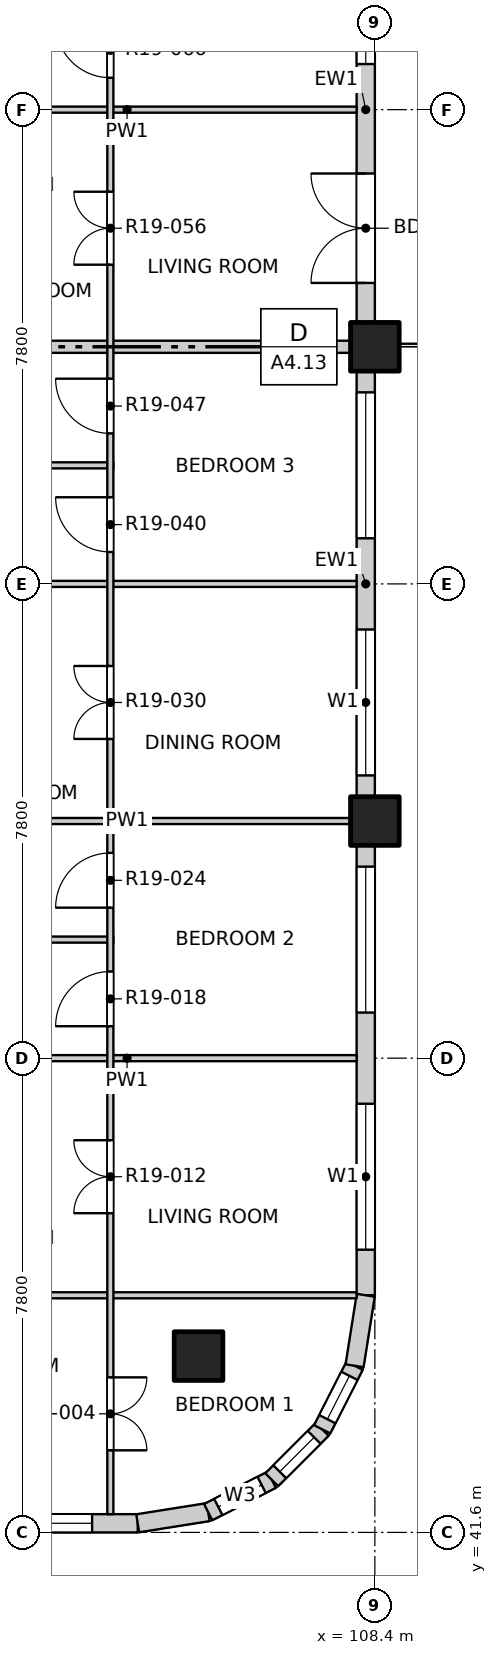
"""IFC4 building model, lengths in metres.
Left out: names, types, materials, properties, quantities, classifications, styles, units other than length and angle.
Written with IfcOpenShell. Run it as: python <this file> out.ifc"""

import sys

from ifc_helpers import new_model, si_unit, direction, frame, frame_2d, origin, origin_2d, place, context, subcontext, project, spatial, rectangle, extrude, element, fill, save


model = new_model("IFC4")
c1 = context("Model", 3, precision=1e-05, world=origin(), true_north=direction((0.0, 1.0)))
c2 = subcontext(c1, "Body", "Model", "MODEL_VIEW")
j1 = project(units=[si_unit("LENGTHUNIT", "METRE"), si_unit("PLANEANGLEUNIT", "RADIAN")], contexts=[c1])
p1 = place(None, origin())
s1 = spatial("IfcSite", under=j1, at=p1, CompositionType="ELEMENT")
p2 = place(p1, origin())
s2 = spatial("IfcBuilding", under=s1, at=p2, CompositionType="ELEMENT")
p3 = place(p2, frame((0.0, 0.0, 197.3)))
s3 = spatial("IfcBuildingStorey", under=s2, at=p3, CompositionType="ELEMENT", Elevation=197.3)
for number, where, z_axis, x_axis in (
    (1, (105.5, 44.5, -0.3), (0.0, 0.0, 1.0), (1.0, 0.0, 0.0)),
    (2, (108.4, 53.3, -0.3), (0.0, 0.0, 1.0), (1.0, 0.0, 0.0)),
    (3, (108.4, 61.1, -0.3), (0.0, 0.0, 1.0), (1.0, 0.0, 0.0)),
):
    element("IfcColumn", number, at=place(p3, frame(where, z_axis=z_axis, x_axis=x_axis)), inside=s3, PredefinedType="COLUMN", context=c2, shape_type="SweptSolid", body=[
        extrude(rectangle(XDim=0.8, YDim=0.8, at=origin_2d()), origin(), (0.0, 0.0, 1.0), 3.45),
    ])
p4 = place(p3, frame((97.1, 41.75, 0.0), z_axis=(0.0, 0.0, 1.0), x_axis=(1.0, 0.0, 0.0)))
e4 = element("IfcWall", 4, at=p4, inside=s3, PredefinedType="SOLIDWALL", context=c2, shape_type="SweptSolid", body=[
    extrude(rectangle(XDim=7.4, YDim=0.3, at=frame_2d((3.7, 0.0))), origin(), (0.0, 0.0, 1.0), 2.7),
])
p5 = place(p4, frame((0.35, 0.0, 0.9)))
e5 = element("IfcOpeningElement", 5, at=p5, cuts=e4, PredefinedType="OPENING", context=c2, shape_type="SweptSolid", body=[
    extrude(rectangle(XDim=2.4, YDim=1.8, at=frame_2d((1.2, 0.9))), frame((0.0, 0.16, 0.0), z_axis=(0.0, -1.0, 0.0), x_axis=(1.0, 0.0, 0.0)), (0.0, 0.0, 1.0), 0.32),
])
p6 = place(p4, frame((4.25, 0.0, 0.9)))
e6 = element("IfcOpeningElement", 6, at=p6, cuts=e4, PredefinedType="OPENING", context=c2, shape_type="SweptSolid", body=[
    extrude(rectangle(XDim=2.4, YDim=1.8, at=frame_2d((1.2, 0.9))), frame((0.0, 0.16, 0.0), z_axis=(0.0, -1.0, 0.0), x_axis=(1.0, 0.0, 0.0)), (0.0, 0.0, 1.0), 0.32),
])
p7 = place(p3, frame((108.25, 45.5, 0.0), z_axis=(0.0, 0.0, 1.0), x_axis=(0.0, 1.0, 0.0)))
e7 = element("IfcWall", 7, at=p7, inside=s3, PredefinedType="SOLIDWALL", context=c2, shape_type="SweptSolid", body=[
    extrude(rectangle(XDim=7.4, YDim=0.3, at=frame_2d((3.7, 0.0))), origin(), (0.0, 0.0, 1.0), 2.7),
])
p8 = place(p7, frame((0.75, 0.0, 0.9)))
e8 = element("IfcOpeningElement", 8, at=p8, cuts=e7, PredefinedType="OPENING", context=c2, shape_type="SweptSolid", body=[
    extrude(rectangle(XDim=2.4, YDim=1.8, at=frame_2d((1.2, 0.9))), frame((0.0, 0.16, 0.0), z_axis=(0.0, -1.0, 0.0), x_axis=(1.0, 0.0, 0.0)), (0.0, 0.0, 1.0), 0.32),
])
p9 = place(p7, frame((4.65, 0.0, 0.9)))
e9 = element("IfcOpeningElement", 9, at=p9, cuts=e7, PredefinedType="OPENING", context=c2, shape_type="SweptSolid", body=[
    extrude(rectangle(XDim=2.4, YDim=1.8, at=frame_2d((1.2, 0.9))), frame((0.0, 0.16, 0.0), z_axis=(0.0, -1.0, 0.0), x_axis=(1.0, 0.0, 0.0)), (0.0, 0.0, 1.0), 0.32),
])
p10 = place(p3, frame((108.25, 53.7, 0.0), z_axis=(0.0, 0.0, 1.0), x_axis=(0.0, 1.0, 0.0)))
e10 = element("IfcWall", 10, at=p10, inside=s3, PredefinedType="SOLIDWALL", context=c2, shape_type="SweptSolid", body=[
    extrude(rectangle(XDim=7.0, YDim=0.3, at=frame_2d((3.5, 0.0))), origin(), (0.0, 0.0, 1.0), 2.7),
])
p11 = place(p10, frame((0.35, 0.0, 0.9)))
e11 = element("IfcOpeningElement", 11, at=p11, cuts=e10, PredefinedType="OPENING", context=c2, shape_type="SweptSolid", body=[
    extrude(rectangle(XDim=2.4, YDim=1.8, at=frame_2d((1.2, 0.9))), frame((0.0, 0.16, 0.0), z_axis=(0.0, -1.0, 0.0), x_axis=(1.0, 0.0, 0.0)), (0.0, 0.0, 1.0), 0.32),
])
p12 = place(p10, frame((4.25, 0.0, 0.9)))
e12 = element("IfcOpeningElement", 12, at=p12, cuts=e10, PredefinedType="OPENING", context=c2, shape_type="SweptSolid", body=[
    extrude(rectangle(XDim=2.4, YDim=1.8, at=frame_2d((1.2, 0.9))), frame((0.0, 0.16, 0.0), z_axis=(0.0, -1.0, 0.0), x_axis=(1.0, 0.0, 0.0)), (0.0, 0.0, 1.0), 0.32),
])
p13 = place(p3, frame((108.25, 61.5, 0.0), z_axis=(0.0, 0.0, 1.0), x_axis=(0.0, 1.0, 0.0)))
e13 = element("IfcWall", 13, at=p13, inside=s3, PredefinedType="SOLIDWALL", context=c2, shape_type="SweptSolid", body=[
    extrude(rectangle(XDim=7.0, YDim=0.3, at=frame_2d((3.5, 0.0))), origin(), (0.0, 0.0, 1.0), 2.7),
])
p14 = place(p13, frame((0.65, 0.0, 0.0)))
e14 = element("IfcOpeningElement", 14, at=p14, cuts=e13, PredefinedType="OPENING", context=c2, shape_type="SweptSolid", body=[
    extrude(rectangle(XDim=1.8, YDim=2.4, at=frame_2d((0.9, 1.2))), frame((0.0, 0.16, 0.0), z_axis=(0.0, -1.0, 0.0), x_axis=(1.0, 0.0, 0.0)), (0.0, 0.0, 1.0), 0.32),
])
p15 = place(p13, frame((4.25, 0.0, 0.9)))
e15 = element("IfcOpeningElement", 15, at=p15, cuts=e13, PredefinedType="OPENING", context=c2, shape_type="SweptSolid", body=[
    extrude(rectangle(XDim=2.4, YDim=1.8, at=frame_2d((1.2, 0.9))), frame((0.0, 0.16, 0.0), z_axis=(0.0, -1.0, 0.0), x_axis=(1.0, 0.0, 0.0)), (0.0, 0.0, 1.0), 0.32),
])
p16 = place(p3, frame((104.5, 41.75, 0.0), z_axis=(0.0, 0.0, 1.0), x_axis=(0.987678452879, 0.156496880861, 0.0)))
e16 = element("IfcWall", 16, at=p16, inside=s3, PredefinedType="SOLIDWALL", context=c2, shape_type="SweptSolid", body=[
    extrude(rectangle(XDim=1.173, YDim=0.3, at=frame_2d((0.586, 0.0))), origin(), (0.0, 0.0, 1.0), 2.7),
])
p17 = place(p3, frame((105.659, 41.934, 0.0), z_axis=(0.0, 0.0, 1.0), x_axis=(0.890988677504, 0.454025524128, 0.0)))
e17 = element("IfcWall", 17, at=p17, inside=s3, PredefinedType="SOLIDWALL", context=c2, shape_type="SweptSolid", body=[
    extrude(rectangle(XDim=1.173, YDim=0.3, at=frame_2d((0.587, 0.0))), origin(), (0.0, 0.0, 1.0), 2.7),
])
p18 = place(p17, frame((0.187, 0.0, 0.9)))
e18 = element("IfcOpeningElement", 18, at=p18, cuts=e17, PredefinedType="OPENING", context=c2, shape_type="SweptSolid", body=[
    extrude(rectangle(XDim=0.8, YDim=1.2, at=frame_2d((0.4, 0.6))), frame((0.0, 0.16, 0.0), z_axis=(0.0, -1.0, 0.0), x_axis=(1.0, 0.0, 0.0)), (0.0, 0.0, 1.0), 0.32),
])
p19 = place(p3, frame((106.704, 42.466, 0.0), z_axis=(0.0, 0.0, 1.0), x_axis=(0.707106781187, 0.707106781187, 0.0)))
e19 = element("IfcWall", 19, at=p19, inside=s3, PredefinedType="SOLIDWALL", context=c2, shape_type="SweptSolid", body=[
    extrude(rectangle(XDim=1.173, YDim=0.3, at=frame_2d((0.586, 0.0))), origin(), (0.0, 0.0, 1.0), 2.7),
])
p20 = place(p19, frame((0.187, 0.0, 0.9)))
e20 = element("IfcOpeningElement", 20, at=p20, cuts=e19, PredefinedType="OPENING", context=c2, shape_type="SweptSolid", body=[
    extrude(rectangle(XDim=0.8, YDim=1.2, at=frame_2d((0.4, 0.6))), frame((0.0, 0.16, 0.0), z_axis=(0.0, -1.0, 0.0), x_axis=(1.0, 0.0, 0.0)), (0.0, 0.0, 1.0), 0.32),
])
p21 = place(p3, frame((107.534, 43.296, 0.0), z_axis=(0.0, 0.0, 1.0), x_axis=(0.454025524128, 0.890988677504, 0.0)))
e21 = element("IfcWall", 21, at=p21, inside=s3, PredefinedType="SOLIDWALL", context=c2, shape_type="SweptSolid", body=[
    extrude(rectangle(XDim=1.173, YDim=0.3, at=frame_2d((0.587, 0.0))), origin(), (0.0, 0.0, 1.0), 2.7),
])
p22 = place(p21, frame((0.187, 0.0, 0.9)))
e22 = element("IfcOpeningElement", 22, at=p22, cuts=e21, PredefinedType="OPENING", context=c2, shape_type="SweptSolid", body=[
    extrude(rectangle(XDim=0.8, YDim=1.2, at=frame_2d((0.4, 0.6))), frame((0.0, 0.16, 0.0), z_axis=(0.0, -1.0, 0.0), x_axis=(1.0, 0.0, 0.0)), (0.0, 0.0, 1.0), 0.32),
])
p23 = place(p3, frame((108.066, 44.341, 0.0), z_axis=(0.0, 0.0, 1.0), x_axis=(0.156496880861, 0.987678452879, 0.0)))
e23 = element("IfcWall", 23, at=p23, inside=s3, PredefinedType="SOLIDWALL", context=c2, shape_type="SweptSolid", body=[
    extrude(rectangle(XDim=1.173, YDim=0.3, at=frame_2d((0.586, 0.0))), origin(), (0.0, 0.0, 1.0), 2.7),
])
p24 = place(p3, frame((96.625, 45.5, 0.0), z_axis=(0.0, 0.0, 1.0), x_axis=(1.0, 0.0, 0.0)))
e24 = element("IfcWall", 24, at=p24, inside=s3, PredefinedType="PARTITIONING", context=c2, shape_type="SweptSolid", body=[
    extrude(rectangle(XDim=11.475, YDim=0.1, at=frame_2d((5.738, 0.0))), origin(), (0.0, 0.0, 1.0), 3.15),
])
p25 = place(p24, frame((2.61, 0.0, 0.0)))
e25 = element("IfcOpeningElement", 25, at=p25, cuts=e24, PredefinedType="OPENING", context=c2, shape_type="SweptSolid", body=[
    extrude(rectangle(XDim=0.9, YDim=2.1, at=frame_2d((0.45, 1.05))), frame((0.0, 0.06, 0.0), z_axis=(0.0, -1.0, 0.0), x_axis=(1.0, 0.0, 0.0)), (0.0, 0.0, 1.0), 0.12),
])
p26 = place(p3, frame((100.55, 49.4, 0.0), z_axis=(0.0, 0.0, 1.0), x_axis=(1.0, 0.0, 0.0)))
e26 = element("IfcWall", 26, at=p26, inside=s3, PredefinedType="PARTITIONING", context=c2, shape_type="SweptSolid", body=[
    extrude(rectangle(XDim=7.55, YDim=0.1, at=frame_2d((3.775, 0.0))), origin(), (0.0, 0.0, 1.0), 3.15),
])
p27 = place(p3, frame((100.55, 51.35, 0.0), z_axis=(0.0, 0.0, 1.0), x_axis=(1.0, 0.0, 0.0)))
e27 = element("IfcWall", 27, at=p27, inside=s3, PredefinedType="PARTITIONING", context=c2, shape_type="SweptSolid", body=[
    extrude(rectangle(XDim=3.55, YDim=0.1, at=frame_2d((1.775, 0.0))), origin(), (0.0, 0.0, 1.0), 3.15),
])
for number, where, z_axis, x_axis in (
    (28, (100.55, 53.3, 0.0), (0.0, 0.0, 1.0), (1.0, 0.0, 0.0)),
    (29, (100.55, 57.2, 0.0), (0.0, 0.0, 1.0), (1.0, 0.0, 0.0)),
):
    element("IfcWall", number, at=place(p3, frame(where, z_axis=z_axis, x_axis=x_axis)), inside=s3, PredefinedType="PARTITIONING", context=c2, shape_type="SweptSolid", body=[
        extrude(rectangle(XDim=7.55, YDim=0.1, at=frame_2d((3.775, 0.0))), origin(), (0.0, 0.0, 1.0), 3.15),
    ])
p28 = place(p3, frame((100.55, 59.15, 0.0), z_axis=(0.0, 0.0, 1.0), x_axis=(1.0, 0.0, 0.0)))
e30 = element("IfcWall", 30, at=p28, inside=s3, PredefinedType="PARTITIONING", context=c2, shape_type="SweptSolid", body=[
    extrude(rectangle(XDim=3.55, YDim=0.1, at=frame_2d((1.775, 0.0))), origin(), (0.0, 0.0, 1.0), 3.15),
])
p29 = place(p3, frame((96.6, 61.1, 0.0), z_axis=(0.0, 0.0, 1.0), x_axis=(1.0, 0.0, 0.0)))
e31 = element("IfcWall", 31, at=p29, inside=s3, PredefinedType="PARTITIONING", context=c2, shape_type="SweptSolid", body=[
    extrude(rectangle(XDim=11.5, YDim=0.2, at=frame_2d((5.75, 0.0))), origin(), (0.0, 0.0, 1.0), 2.55),
])
p30 = place(p3, frame((100.55, 65.0, 0.0), z_axis=(0.0, 0.0, 1.0), x_axis=(1.0, 0.0, 0.0)))
e32 = element("IfcWall", 32, at=p30, inside=s3, PredefinedType="PARTITIONING", context=c2, shape_type="SweptSolid", body=[
    extrude(rectangle(XDim=7.55, YDim=0.1, at=frame_2d((3.775, 0.0))), origin(), (0.0, 0.0, 1.0), 3.15),
])
p31 = place(p3, frame((104.05, 41.9, 0.0), z_axis=(0.0, 0.0, 1.0), x_axis=(0.0, 1.0, 0.0)))
e33 = element("IfcWall", 33, at=p31, inside=s3, PredefinedType="PARTITIONING", context=c2, shape_type="SweptSolid", body=[
    extrude(rectangle(XDim=26.9, YDim=0.1, at=frame_2d((13.45, 0.0))), origin(), (0.0, 0.0, 1.0), 3.15),
])
p32 = place(p31, frame((1.05, 0.0, 0.0)))
e34 = element("IfcOpeningElement", 34, at=p32, cuts=e33, PredefinedType="OPENING", context=c2, shape_type="SweptSolid", body=[
    extrude(rectangle(XDim=1.2, YDim=2.1, at=frame_2d((0.6, 1.05))), frame((0.0, 0.06, 0.0), z_axis=(0.0, -1.0, 0.0), x_axis=(1.0, 0.0, 0.0)), (0.0, 0.0, 1.0), 0.12),
])
p33 = place(p31, frame((4.95, 0.0, 0.0)))
e35 = element("IfcOpeningElement", 35, at=p33, cuts=e33, PredefinedType="OPENING", context=c2, shape_type="SweptSolid", body=[
    extrude(rectangle(XDim=1.2, YDim=2.1, at=frame_2d((0.6, 1.05))), frame((0.0, 0.06, 0.0), z_axis=(0.0, -1.0, 0.0), x_axis=(1.0, 0.0, 0.0)), (0.0, 0.0, 1.0), 0.12),
])
p34 = place(p31, frame((8.025, 0.0, 0.0)))
e36 = element("IfcOpeningElement", 36, at=p34, cuts=e33, PredefinedType="OPENING", context=c2, shape_type="SweptSolid", body=[
    extrude(rectangle(XDim=0.9, YDim=2.1, at=frame_2d((0.45, 1.05))), frame((0.0, 0.06, 0.0), z_axis=(0.0, -1.0, 0.0), x_axis=(1.0, 0.0, 0.0)), (0.0, 0.0, 1.0), 0.12),
])
p35 = place(p31, frame((9.975, 0.0, 0.0)))
e37 = element("IfcOpeningElement", 37, at=p35, cuts=e33, PredefinedType="OPENING", context=c2, shape_type="SweptSolid", body=[
    extrude(rectangle(XDim=0.9, YDim=2.1, at=frame_2d((0.45, 1.05))), frame((0.0, 0.06, 0.0), z_axis=(0.0, -1.0, 0.0), x_axis=(1.0, 0.0, 0.0)), (0.0, 0.0, 1.0), 0.12),
])
p36 = place(p31, frame((12.75, 0.0, 0.0)))
e38 = element("IfcOpeningElement", 38, at=p36, cuts=e33, PredefinedType="OPENING", context=c2, shape_type="SweptSolid", body=[
    extrude(rectangle(XDim=1.2, YDim=2.1, at=frame_2d((0.6, 1.05))), frame((0.0, 0.06, 0.0), z_axis=(0.0, -1.0, 0.0), x_axis=(1.0, 0.0, 0.0)), (0.0, 0.0, 1.0), 0.12),
])
p37 = place(p31, frame((15.825, 0.0, 0.0)))
e39 = element("IfcOpeningElement", 39, at=p37, cuts=e33, PredefinedType="OPENING", context=c2, shape_type="SweptSolid", body=[
    extrude(rectangle(XDim=0.9, YDim=2.1, at=frame_2d((0.45, 1.05))), frame((0.0, 0.06, 0.0), z_axis=(0.0, -1.0, 0.0), x_axis=(1.0, 0.0, 0.0)), (0.0, 0.0, 1.0), 0.12),
])
p38 = place(p31, frame((17.775, 0.0, 0.0)))
e40 = element("IfcOpeningElement", 40, at=p38, cuts=e33, PredefinedType="OPENING", context=c2, shape_type="SweptSolid", body=[
    extrude(rectangle(XDim=0.9, YDim=2.1, at=frame_2d((0.45, 1.05))), frame((0.0, 0.06, 0.0), z_axis=(0.0, -1.0, 0.0), x_axis=(1.0, 0.0, 0.0)), (0.0, 0.0, 1.0), 0.12),
])
p39 = place(p31, frame((20.55, 0.0, 0.0)))
e41 = element("IfcOpeningElement", 41, at=p39, cuts=e33, PredefinedType="OPENING", context=c2, shape_type="SweptSolid", body=[
    extrude(rectangle(XDim=1.2, YDim=2.1, at=frame_2d((0.6, 1.05))), frame((0.0, 0.06, 0.0), z_axis=(0.0, -1.0, 0.0), x_axis=(1.0, 0.0, 0.0)), (0.0, 0.0, 1.0), 0.12),
])
p40 = place(p31, frame((23.625, 0.0, 0.0)))
e42 = element("IfcOpeningElement", 42, at=p40, cuts=e33, PredefinedType="OPENING", context=c2, shape_type="SweptSolid", body=[
    extrude(rectangle(XDim=0.9, YDim=2.1, at=frame_2d((0.45, 1.05))), frame((0.0, 0.06, 0.0), z_axis=(0.0, -1.0, 0.0), x_axis=(1.0, 0.0, 0.0)), (0.0, 0.0, 1.0), 0.12),
])
p41 = place(p31, frame((25.575, 0.0, 0.0)))
e43 = element("IfcOpeningElement", 43, at=p41, cuts=e33, PredefinedType="OPENING", context=c2, shape_type="SweptSolid", body=[
    extrude(rectangle(XDim=0.9, YDim=2.1, at=frame_2d((0.45, 1.05))), frame((0.0, 0.06, 0.0), z_axis=(0.0, -1.0, 0.0), x_axis=(1.0, 0.0, 0.0)), (0.0, 0.0, 1.0), 0.12),
])
p42 = place(p6, origin())
e44 = element("IfcWindow", 44, at=p42, inside=s3, PartitioningType="DOUBLE_PANEL_VERTICAL", PredefinedType="WINDOW", context=c2, shape_type="SweptSolid", body=[
    extrude(rectangle(XDim=2.4, YDim=1.8, at=frame_2d((1.2, 0.9))), frame((0.0, 0.03, 0.0), z_axis=(0.0, -1.0, 0.0), x_axis=(1.0, 0.0, 0.0)), (0.0, 0.0, 1.0), 0.06),
])
fill(e6, e44)
p43 = place(p8, origin())
e45 = element("IfcWindow", 45, at=p43, inside=s3, PartitioningType="DOUBLE_PANEL_VERTICAL", PredefinedType="WINDOW", context=c2, shape_type="SweptSolid", body=[
    extrude(rectangle(XDim=2.4, YDim=1.8, at=frame_2d((1.2, 0.9))), frame((0.0, 0.03, 0.0), z_axis=(0.0, -1.0, 0.0), x_axis=(1.0, 0.0, 0.0)), (0.0, 0.0, 1.0), 0.06),
])
fill(e8, e45)
p44 = place(p9, origin())
e46 = element("IfcWindow", 46, at=p44, inside=s3, PartitioningType="DOUBLE_PANEL_VERTICAL", PredefinedType="WINDOW", context=c2, shape_type="SweptSolid", body=[
    extrude(rectangle(XDim=2.4, YDim=1.8, at=frame_2d((1.2, 0.9))), frame((0.0, 0.03, 0.0), z_axis=(0.0, -1.0, 0.0), x_axis=(1.0, 0.0, 0.0)), (0.0, 0.0, 1.0), 0.06),
])
fill(e9, e46)
p45 = place(p11, origin())
e47 = element("IfcWindow", 47, at=p45, inside=s3, PartitioningType="DOUBLE_PANEL_VERTICAL", PredefinedType="WINDOW", context=c2, shape_type="SweptSolid", body=[
    extrude(rectangle(XDim=2.4, YDim=1.8, at=frame_2d((1.2, 0.9))), frame((0.0, 0.03, 0.0), z_axis=(0.0, -1.0, 0.0), x_axis=(1.0, 0.0, 0.0)), (0.0, 0.0, 1.0), 0.06),
])
fill(e11, e47)
p46 = place(p12, origin())
e48 = element("IfcWindow", 48, at=p46, inside=s3, PartitioningType="DOUBLE_PANEL_VERTICAL", PredefinedType="WINDOW", context=c2, shape_type="SweptSolid", body=[
    extrude(rectangle(XDim=2.4, YDim=1.8, at=frame_2d((1.2, 0.9))), frame((0.0, 0.03, 0.0), z_axis=(0.0, -1.0, 0.0), x_axis=(1.0, 0.0, 0.0)), (0.0, 0.0, 1.0), 0.06),
])
fill(e12, e48)
p47 = place(p14, origin())
e49 = element("IfcDoor", 49, at=p47, inside=s3, OperationType="DOUBLE_DOOR_SINGLE_SWING", PredefinedType="DOOR", context=c2, shape_type="SweptSolid", body=[
    extrude(rectangle(XDim=1.8, YDim=2.4, at=frame_2d((0.9, 1.2))), frame((0.0, 0.025, 0.0), z_axis=(0.0, -1.0, 0.0), x_axis=(1.0, 0.0, 0.0)), (0.0, 0.0, 1.0), 0.05),
])
fill(e14, e49)
p48 = place(p15, origin())
e50 = element("IfcWindow", 50, at=p48, inside=s3, PartitioningType="DOUBLE_PANEL_VERTICAL", PredefinedType="WINDOW", context=c2, shape_type="SweptSolid", body=[
    extrude(rectangle(XDim=2.4, YDim=1.8, at=frame_2d((1.2, 0.9))), frame((0.0, 0.03, 0.0), z_axis=(0.0, -1.0, 0.0), x_axis=(1.0, 0.0, 0.0)), (0.0, 0.0, 1.0), 0.06),
])
fill(e15, e50)
p49 = place(p18, origin())
e51 = element("IfcWindow", 51, at=p49, inside=s3, PartitioningType="SINGLE_PANEL", PredefinedType="WINDOW", context=c2, shape_type="SweptSolid", body=[
    extrude(rectangle(XDim=0.8, YDim=1.2, at=frame_2d((0.4, 0.6))), frame((0.0, 0.03, 0.0), z_axis=(0.0, -1.0, 0.0), x_axis=(1.0, 0.0, 0.0)), (0.0, 0.0, 1.0), 0.06),
])
fill(e18, e51)
p50 = place(p20, origin())
e52 = element("IfcWindow", 52, at=p50, inside=s3, PartitioningType="SINGLE_PANEL", PredefinedType="WINDOW", context=c2, shape_type="SweptSolid", body=[
    extrude(rectangle(XDim=0.8, YDim=1.2, at=frame_2d((0.4, 0.6))), frame((0.0, 0.03, 0.0), z_axis=(0.0, -1.0, 0.0), x_axis=(1.0, 0.0, 0.0)), (0.0, 0.0, 1.0), 0.06),
])
fill(e20, e52)
p51 = place(p22, origin())
e53 = element("IfcWindow", 53, at=p51, inside=s3, PartitioningType="SINGLE_PANEL", PredefinedType="WINDOW", context=c2, shape_type="SweptSolid", body=[
    extrude(rectangle(XDim=0.8, YDim=1.2, at=frame_2d((0.4, 0.6))), frame((0.0, 0.03, 0.0), z_axis=(0.0, -1.0, 0.0), x_axis=(1.0, 0.0, 0.0)), (0.0, 0.0, 1.0), 0.06),
])
fill(e22, e53)
p52 = place(p32, origin())
e54 = element("IfcDoor", 54, at=p52, inside=s3, OperationType="DOUBLE_DOOR_SINGLE_SWING", PredefinedType="DOOR", context=c2, shape_type="SweptSolid", body=[
    extrude(rectangle(XDim=1.2, YDim=2.1, at=frame_2d((0.6, 1.05))), frame((0.0, 0.025, 0.0), z_axis=(0.0, -1.0, 0.0), x_axis=(1.0, 0.0, 0.0)), (0.0, 0.0, 1.0), 0.05),
])
fill(e34, e54)
p53 = place(p33, origin())
e55 = element("IfcDoor", 55, at=p53, inside=s3, OperationType="DOUBLE_DOOR_SINGLE_SWING", PredefinedType="DOOR", context=c2, shape_type="SweptSolid", body=[
    extrude(rectangle(XDim=1.2, YDim=2.1, at=frame_2d((0.6, 1.05))), frame((0.0, 0.025, 0.0), z_axis=(0.0, -1.0, 0.0), x_axis=(1.0, 0.0, 0.0)), (0.0, 0.0, 1.0), 0.05),
])
fill(e35, e55)
p54 = place(p34, origin())
e56 = element("IfcDoor", 56, at=p54, inside=s3, OperationType="SINGLE_SWING_LEFT", PredefinedType="DOOR", context=c2, shape_type="SweptSolid", body=[
    extrude(rectangle(XDim=0.9, YDim=2.1, at=frame_2d((0.45, 1.05))), frame((0.0, 0.025, 0.0), z_axis=(0.0, -1.0, 0.0), x_axis=(1.0, 0.0, 0.0)), (0.0, 0.0, 1.0), 0.05),
])
fill(e36, e56)
p55 = place(p35, origin())
e57 = element("IfcDoor", 57, at=p55, inside=s3, OperationType="SINGLE_SWING_LEFT", PredefinedType="DOOR", context=c2, shape_type="SweptSolid", body=[
    extrude(rectangle(XDim=0.9, YDim=2.1, at=frame_2d((0.45, 1.05))), frame((0.0, 0.025, 0.0), z_axis=(0.0, -1.0, 0.0), x_axis=(1.0, 0.0, 0.0)), (0.0, 0.0, 1.0), 0.05),
])
fill(e37, e57)
p56 = place(p36, origin())
e58 = element("IfcDoor", 58, at=p56, inside=s3, OperationType="DOUBLE_DOOR_SINGLE_SWING", PredefinedType="DOOR", context=c2, shape_type="SweptSolid", body=[
    extrude(rectangle(XDim=1.2, YDim=2.1, at=frame_2d((0.6, 1.05))), frame((0.0, 0.025, 0.0), z_axis=(0.0, -1.0, 0.0), x_axis=(1.0, 0.0, 0.0)), (0.0, 0.0, 1.0), 0.05),
])
fill(e38, e58)
p57 = place(p37, origin())
e59 = element("IfcDoor", 59, at=p57, inside=s3, OperationType="SINGLE_SWING_RIGHT", PredefinedType="DOOR", context=c2, shape_type="SweptSolid", body=[
    extrude(rectangle(XDim=0.9, YDim=2.1, at=frame_2d((0.45, 1.05))), frame((0.0, 0.025, 0.0), z_axis=(0.0, -1.0, 0.0), x_axis=(1.0, 0.0, 0.0)), (0.0, 0.0, 1.0), 0.05),
])
fill(e39, e59)
p58 = place(p38, origin())
e60 = element("IfcDoor", 60, at=p58, inside=s3, OperationType="SINGLE_SWING_RIGHT", PredefinedType="DOOR", context=c2, shape_type="SweptSolid", body=[
    extrude(rectangle(XDim=0.9, YDim=2.1, at=frame_2d((0.45, 1.05))), frame((0.0, 0.025, 0.0), z_axis=(0.0, -1.0, 0.0), x_axis=(1.0, 0.0, 0.0)), (0.0, 0.0, 1.0), 0.05),
])
fill(e40, e60)
p59 = place(p39, origin())
e61 = element("IfcDoor", 61, at=p59, inside=s3, OperationType="DOUBLE_DOOR_SINGLE_SWING", PredefinedType="DOOR", context=c2, shape_type="SweptSolid", body=[
    extrude(rectangle(XDim=1.2, YDim=2.1, at=frame_2d((0.6, 1.05))), frame((0.0, 0.025, 0.0), z_axis=(0.0, -1.0, 0.0), x_axis=(1.0, 0.0, 0.0)), (0.0, 0.0, 1.0), 0.05),
])
fill(e41, e61)
p60 = place(p40, origin())
e62 = element("IfcDoor", 62, at=p60, inside=s3, OperationType="SINGLE_SWING_RIGHT", PredefinedType="DOOR", context=c2, shape_type="SweptSolid", body=[
    extrude(rectangle(XDim=0.9, YDim=2.1, at=frame_2d((0.45, 1.05))), frame((0.0, 0.025, 0.0), z_axis=(0.0, -1.0, 0.0), x_axis=(1.0, 0.0, 0.0)), (0.0, 0.0, 1.0), 0.05),
])
fill(e42, e62)
save(model, sys.argv[1])
